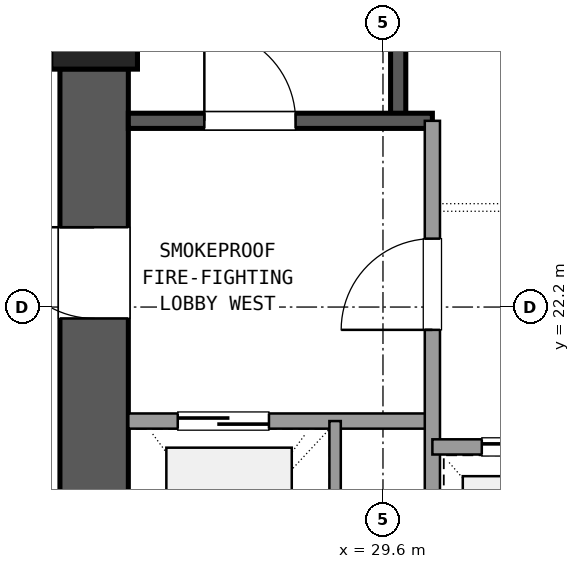
"""IFC4 building model, lengths in metres.
Left out: names, types, materials, properties, quantities, classifications, styles, units other than length and angle.
Written with IfcOpenShell. Run it as: python <this file> out.ifc"""

import sys

from ifc_helpers import new_model, si_unit, direction, frame, frame_2d, origin, origin_2d, place, context, subcontext, project, spatial, rectangle, extrude, element, fill, save


model = new_model("IFC4")
c1 = context("Model", 3, precision=1e-05, world=origin(), true_north=direction((0.0, 1.0)))
c2 = subcontext(c1, "Body", "Model", "MODEL_VIEW")
j1 = project(units=[si_unit("LENGTHUNIT", "METRE"), si_unit("PLANEANGLEUNIT", "RADIAN")], contexts=[c1])
p1 = place(None, origin())
s1 = spatial("IfcSite", under=j1, at=p1, CompositionType="ELEMENT")
p2 = place(p1, origin())
s2 = spatial("IfcBuilding", under=s1, at=p2, CompositionType="ELEMENT")
p3 = place(p2, frame((0.0, 0.0, 23.94)))
s3 = spatial("IfcBuildingStorey", under=s2, at=p3, CompositionType="ELEMENT", Elevation=23.94)
p4 = place(p3, frame((25.8, 25.9, 0.0), z_axis=(0.0, 0.0, 1.0), x_axis=(1.0, 0.0, 0.0)))
e1 = element("IfcColumn", 1, at=p4, inside=s3, PredefinedType="COLUMN", context=c2, shape_type="SweptSolid", body=[
    extrude(rectangle(XDim=1.14, YDim=1.14, at=origin_2d()), origin(), (0.0, 0.0, 1.0), 3.6),
])
p5 = place(p3, frame((25.8, 25.335, 0.0), z_axis=(0.0, 0.0, 1.0), x_axis=(0.0, -1.0, 0.0)))
e2 = element("IfcWall", 2, at=p5, inside=s3, PredefinedType="SHEAR", context=c2, shape_type="SweptSolid", body=[
    extrude(rectangle(XDim=7.47, YDim=0.9, at=frame_2d((3.735, 0.0))), origin(), (0.0, 0.0, 1.0), 3.32),
])
p6 = place(p5, frame((2.085, 0.0, 0.0)))
e3 = element("IfcOpeningElement", 3, at=p6, cuts=e2, PredefinedType="OPENING", context=c2, shape_type="SweptSolid", body=[
    extrude(rectangle(XDim=1.2, YDim=2.15, at=frame_2d((0.6, 1.075))), frame((0.0, 0.46, 0.0), z_axis=(0.0, -1.0, 0.0), x_axis=(1.0, 0.0, 0.0)), (0.0, 0.0, 1.0), 0.92),
])
p7 = place(p3, frame((29.8, 24.65, 0.0), z_axis=(0.0, 0.0, 1.0), x_axis=(0.0, 1.0, 0.0)))
e4 = element("IfcWall", 4, at=p7, inside=s3, PredefinedType="SHEAR", context=c2, shape_type="SweptSolid", body=[
    extrude(rectangle(XDim=9.4, YDim=0.2, at=frame_2d((4.7, 0.0))), origin(), (0.0, 0.0, 1.0), 3.32),
])
p8 = place(p3, frame((26.25, 24.65, 0.0), z_axis=(0.0, 0.0, 1.0), x_axis=(1.0, 0.0, 0.0)))
e5 = element("IfcWall", 5, at=p8, inside=s3, PredefinedType="SHEAR", context=c2, shape_type="SweptSolid", body=[
    extrude(rectangle(XDim=4.0, YDim=0.2, at=frame_2d((2.0, 0.0))), origin(), (0.0, 0.0, 1.0), 3.32),
])
p9 = place(p8, frame((1.0, 0.0, 0.0)))
e6 = element("IfcOpeningElement", 6, at=p9, cuts=e5, PredefinedType="OPENING", context=c2, shape_type="SweptSolid", body=[
    extrude(rectangle(XDim=1.2, YDim=2.15, at=frame_2d((0.6, 1.075))), frame((0.0, 0.11, 0.0), z_axis=(0.0, -1.0, 0.0), x_axis=(1.0, 0.0, 0.0)), (0.0, 0.0, 1.0), 0.22),
])
p10 = place(p3, frame((26.25, 20.7, 0.0), z_axis=(0.0, 0.0, 1.0), x_axis=(1.0, 0.0, 0.0)))
e7 = element("IfcWall", 7, at=p10, inside=s3, PredefinedType="SOLIDWALL", context=c2, shape_type="SweptSolid", body=[
    extrude(rectangle(XDim=4.0, YDim=0.2, at=frame_2d((2.0, 0.0))), origin(), (0.0, 0.0, 1.0), 2.61),
])
p11 = place(p10, frame((0.65, 0.0, 0.0)))
e8 = element("IfcOpeningElement", 8, at=p11, cuts=e7, PredefinedType="OPENING", context=c2, shape_type="SweptSolid", body=[
    extrude(rectangle(XDim=1.2, YDim=2.15, at=frame_2d((0.6, 1.075))), frame((0.0, 0.11, 0.0), z_axis=(0.0, -1.0, 0.0), x_axis=(1.0, 0.0, 0.0)), (0.0, 0.0, 1.0), 0.22),
])
p12 = place(p3, frame((30.25, 17.75, 0.0), z_axis=(0.0, 0.0, 1.0), x_axis=(0.0, 1.0, 0.0)))
e9 = element("IfcWall", 9, at=p12, inside=s3, PredefinedType="SOLIDWALL", context=c2, shape_type="SweptSolid", body=[
    extrude(rectangle(XDim=6.9, YDim=0.2, at=frame_2d((3.45, 0.0))), origin(), (0.0, 0.0, 1.0), 2.61),
])
p13 = place(p12, frame((4.15, 0.0, 0.0)))
e10 = element("IfcOpeningElement", 10, at=p13, cuts=e9, PredefinedType="OPENING", context=c2, shape_type="SweptSolid", body=[
    extrude(rectangle(XDim=1.2, YDim=2.15, at=frame_2d((0.6, 1.075))), frame((0.0, 0.11, 0.0), z_axis=(0.0, -1.0, 0.0), x_axis=(1.0, 0.0, 0.0)), (0.0, 0.0, 1.0), 0.22),
])
p14 = place(p3, frame((28.97, 17.75, 0.0), z_axis=(0.0, 0.0, 1.0), x_axis=(0.0, 1.0, 0.0)))
e11 = element("IfcWall", 11, at=p14, inside=s3, PredefinedType="PARTITIONING", context=c2, shape_type="SweptSolid", body=[
    extrude(rectangle(XDim=2.95, YDim=0.15, at=frame_2d((1.475, 0.0))), origin(), (0.0, 0.0, 1.0), 2.61),
])
p15 = place(p3, frame((30.25, 20.36, 0.0), z_axis=(0.0, 0.0, 1.0), x_axis=(1.0, 0.0, 0.0)))
e12 = element("IfcWall", 12, at=p15, inside=s3, PredefinedType="SOLIDWALL", context=c2, shape_type="SweptSolid", body=[
    extrude(rectangle(XDim=7.0, YDim=0.2, at=frame_2d((3.5, 0.0))), origin(), (0.0, 0.0, 1.0), 2.61),
])
p16 = place(p15, frame((0.65, 0.0, 0.0)))
e13 = element("IfcOpeningElement", 13, at=p16, cuts=e12, PredefinedType="OPENING", context=c2, shape_type="SweptSolid", body=[
    extrude(rectangle(XDim=1.1, YDim=2.15, at=frame_2d((0.55, 1.075))), frame((0.0, 0.11, 0.0), z_axis=(0.0, -1.0, 0.0), x_axis=(1.0, 0.0, 0.0)), (0.0, 0.0, 1.0), 0.22),
])
p17 = place(p15, frame((2.95, 0.0, 0.0)))
e14 = element("IfcOpeningElement", 14, at=p17, cuts=e12, PredefinedType="OPENING", context=c2, shape_type="SweptSolid", body=[
    extrude(rectangle(XDim=1.1, YDim=2.15, at=frame_2d((0.55, 1.075))), frame((0.0, 0.11, 0.0), z_axis=(0.0, -1.0, 0.0), x_axis=(1.0, 0.0, 0.0)), (0.0, 0.0, 1.0), 0.22),
])
p18 = place(p15, frame((5.25, 0.0, 0.0)))
e15 = element("IfcOpeningElement", 15, at=p18, cuts=e12, PredefinedType="OPENING", context=c2, shape_type="SweptSolid", body=[
    extrude(rectangle(XDim=1.1, YDim=2.15, at=frame_2d((0.55, 1.075))), frame((0.0, 0.11, 0.0), z_axis=(0.0, -1.0, 0.0), x_axis=(1.0, 0.0, 0.0)), (0.0, 0.0, 1.0), 0.22),
])
p19 = place(p9, origin())
e16 = element("IfcDoor", 16, at=p19, inside=s3, OperationType="SINGLE_SWING_LEFT", PredefinedType="DOOR", context=c2, shape_type="SweptSolid", body=[
    extrude(rectangle(XDim=1.2, YDim=2.15, at=frame_2d((0.6, 1.075))), frame((0.0, 0.025, 0.0), z_axis=(0.0, -1.0, 0.0), x_axis=(1.0, 0.0, 0.0)), (0.0, 0.0, 1.0), 0.05),
])
fill(e6, e16)
p20 = place(p11, origin())
e17 = element("IfcDoor", 17, at=p20, inside=s3, OperationType="SLIDING_TO_LEFT", PredefinedType="DOOR", context=c2, shape_type="SweptSolid", body=[
    extrude(rectangle(XDim=1.2, YDim=2.15, at=frame_2d((0.6, 1.075))), frame((0.0, 0.025, 0.0), z_axis=(0.0, -1.0, 0.0), x_axis=(1.0, 0.0, 0.0)), (0.0, 0.0, 1.0), 0.05),
])
fill(e8, e17)
p21 = place(p13, origin())
e18 = element("IfcDoor", 18, at=p21, inside=s3, OperationType="SINGLE_SWING_LEFT", PredefinedType="DOOR", context=c2, shape_type="SweptSolid", body=[
    extrude(rectangle(XDim=1.2, YDim=2.15, at=frame_2d((0.6, 1.075))), frame((0.0, 0.025, 0.0), z_axis=(0.0, -1.0, 0.0), x_axis=(1.0, 0.0, 0.0)), (0.0, 0.0, 1.0), 0.05),
])
fill(e10, e18)
p22 = place(p6, frame((1.2, 0.0, 0.0), z_axis=(0.0, 0.0, 1.0), x_axis=(-1.0, 0.0, 0.0)))
e19 = element("IfcDoor", 19, at=p22, inside=s3, OperationType="SINGLE_SWING_LEFT", PredefinedType="DOOR", context=c2, shape_type="SweptSolid", body=[
    extrude(rectangle(XDim=1.2, YDim=2.15, at=frame_2d((0.6, 1.075))), frame((0.0, 0.025, 0.0), z_axis=(0.0, -1.0, 0.0), x_axis=(1.0, 0.0, 0.0)), (0.0, 0.0, 1.0), 0.05),
])
fill(e3, e19)
p23 = place(p16, origin())
e20 = element("IfcDoor", 20, at=p23, inside=s3, OperationType="SLIDING_TO_LEFT", PredefinedType="DOOR", context=c2, shape_type="SweptSolid", body=[
    extrude(rectangle(XDim=1.1, YDim=2.15, at=frame_2d((0.55, 1.075))), frame((0.0, 0.025, 0.0), z_axis=(0.0, -1.0, 0.0), x_axis=(1.0, 0.0, 0.0)), (0.0, 0.0, 1.0), 0.05),
])
fill(e13, e20)
save(model, sys.argv[1])
